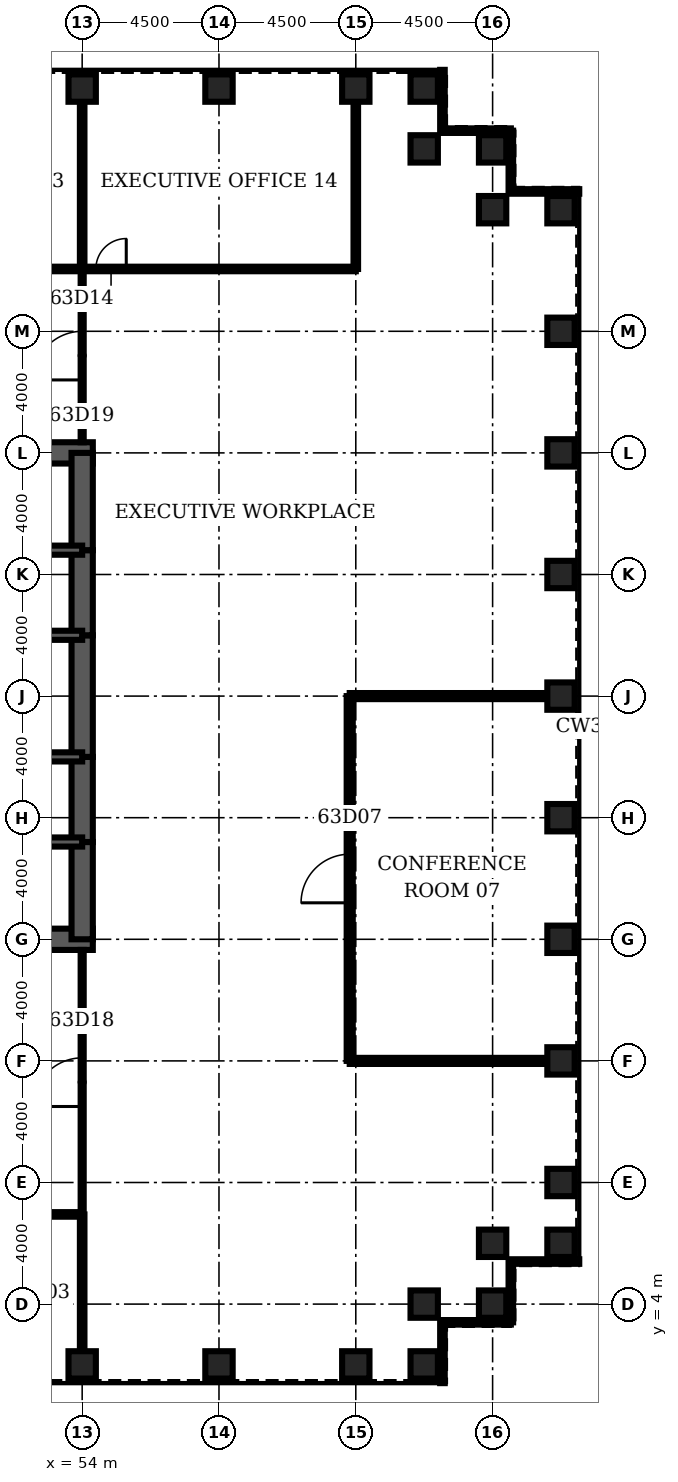
"""IFC4 building model, lengths in metres.
Left out: names, types, materials, properties, quantities, classifications, styles, units other than length and angle.
Written with IfcOpenShell. Run it as: python <this file> out.ifc"""

import sys

from ifc_helpers import new_model, si_unit, direction, frame, frame_2d, origin, origin_2d, place, context, subcontext, project, spatial, rectangle, hollow_rectangle, extrude, element, fill, save


model = new_model("IFC4")
c1 = context("Model", 3, precision=1e-05, world=origin(), true_north=direction((0.0, 1.0)))
c2 = subcontext(c1, "Body", "Model", "MODEL_VIEW")
j1 = project(units=[si_unit("LENGTHUNIT", "METRE"), si_unit("PLANEANGLEUNIT", "RADIAN")], contexts=[c1])
p1 = place(None, origin())
s1 = spatial("IfcSite", under=j1, at=p1, CompositionType="ELEMENT")
p2 = place(p1, origin())
s2 = spatial("IfcBuilding", under=s1, at=p2, CompositionType="ELEMENT")
p3 = place(p2, frame((0.0, 0.0, 279.5)))
s3 = spatial("IfcBuildingStorey", under=s2, at=p3, CompositionType="ELEMENT", Elevation=279.5)
for number, where, z_axis, x_axis in (
    (1, (54.0, 2.0, 0.0), (0.0, 0.0, 1.0), (0.0, 1.0, 0.0)),
    (2, (58.5, 2.0, 0.0), (0.0, 0.0, 1.0), (0.0, 1.0, 0.0)),
    (3, (63.0, 2.0, 0.0), (0.0, 0.0, 1.0), (0.0, 1.0, 0.0)),
    (4, (65.25, 2.0, 0.0), (0.0, 0.0, 1.0), (0.0, 1.0, 0.0)),
    (5, (65.25, 4.0, 0.0), (0.0, 0.0, 1.0), (0.0, 1.0, 0.0)),
    (6, (67.5, 4.0, 0.0), (0.0, 0.0, 1.0), (1.0, 0.0, 0.0)),
    (7, (67.5, 6.0, 0.0), (0.0, 0.0, 1.0), (1.0, 0.0, 0.0)),
    (8, (69.75, 6.0, 0.0), (0.0, 0.0, 1.0), (1.0, 0.0, 0.0)),
    (9, (69.75, 8.0, 0.0), (0.0, 0.0, 1.0), (1.0, 0.0, 0.0)),
    (10, (69.75, 12.0, 0.0), (0.0, 0.0, 1.0), (1.0, 0.0, 0.0)),
    (11, (69.75, 16.0, 0.0), (0.0, 0.0, 1.0), (1.0, 0.0, 0.0)),
    (12, (69.75, 20.0, 0.0), (0.0, 0.0, 1.0), (1.0, 0.0, 0.0)),
    (13, (69.75, 24.0, 0.0), (0.0, 0.0, 1.0), (1.0, 0.0, 0.0)),
    (14, (69.75, 28.0, 0.0), (0.0, 0.0, 1.0), (1.0, 0.0, 0.0)),
    (15, (69.75, 32.0, 0.0), (0.0, 0.0, 1.0), (1.0, 0.0, 0.0)),
    (16, (69.75, 36.0, 0.0), (0.0, 0.0, 1.0), (1.0, 0.0, 0.0)),
    (17, (69.75, 40.0, 0.0), (0.0, 0.0, 1.0), (1.0, 0.0, 0.0)),
    (18, (67.5, 40.0, 0.0), (0.0, 0.0, 1.0), (1.0, 0.0, 0.0)),
    (19, (67.5, 42.0, 0.0), (0.0, 0.0, 1.0), (1.0, 0.0, 0.0)),
    (20, (65.25, 42.0, 0.0), (0.0, 0.0, 1.0), (0.0, 1.0, 0.0)),
    (21, (65.25, 44.0, 0.0), (0.0, 0.0, 1.0), (0.0, 1.0, 0.0)),
    (22, (63.0, 44.0, 0.0), (0.0, 0.0, 1.0), (0.0, 1.0, 0.0)),
    (23, (58.5, 44.0, 0.0), (0.0, 0.0, 1.0), (0.0, 1.0, 0.0)),
    (24, (54.0, 44.0, 0.0), (0.0, 0.0, 1.0), (0.0, 1.0, 0.0)),
):
    element("IfcColumn", number, at=place(p3, frame(where, z_axis=z_axis, x_axis=x_axis)), inside=s3, PredefinedType="COLUMN", context=c2, shape_type="SweptSolid", body=[
        extrude(hollow_rectangle(XDim=0.9, YDim=0.9, WallThickness=0.07, at=origin_2d()), origin(), (0.0, 0.0, 1.0), 4.2),
    ])
for number, where, z_axis, x_axis in (
    (25, (45.0, 16.0, 0.0), (0.0, 0.0, 1.0), (1.0, 0.0, 0.0)),
    (26, (54.35, 32.0, 0.0), (0.0, 0.0, 1.0), (-1.0, 0.0, 0.0)),
):
    element("IfcWall", number, at=place(p3, frame(where, z_axis=z_axis, x_axis=x_axis)), inside=s3, PredefinedType="SHEAR", context=c2, shape_type="SweptSolid", body=[
        extrude(rectangle(XDim=9.35, YDim=0.7, at=frame_2d((4.675, 0.0))), origin(), (0.0, 0.0, 1.0), 4.2),
    ])
p4 = place(p3, frame((54.0, 16.0, 0.0), z_axis=(0.0, 0.0, 1.0), x_axis=(0.0, 1.0, 0.0)))
e27 = element("IfcWall", 27, at=p4, inside=s3, PredefinedType="SHEAR", context=c2, shape_type="SweptSolid", body=[
    extrude(rectangle(XDim=3.2, YDim=0.7, at=frame_2d((1.6, 0.0))), origin(), (0.0, 0.0, 1.0), 4.2),
])
p5 = place(p3, frame((54.0, 19.2, 0.0), z_axis=(0.0, 0.0, 1.0), x_axis=(0.0, 1.0, 0.0)))
e28 = element("IfcWall", 28, at=p5, inside=s3, PredefinedType="SHEAR", context=c2, shape_type="SweptSolid", body=[
    extrude(rectangle(XDim=2.8, YDim=0.7, at=frame_2d((1.4, 0.0))), origin(), (0.0, 0.0, 1.0), 4.2),
])
p6 = place(p5, frame((0.4, 0.0, 0.0)))
e29 = element("IfcOpeningElement", 29, at=p6, cuts=e28, PredefinedType="OPENING", context=c2, shape_type="SweptSolid", body=[
    extrude(rectangle(XDim=1.8, YDim=2.1, at=frame_2d((0.9, 1.05))), frame((0.0, 0.36, 0.0), z_axis=(0.0, -1.0, 0.0), x_axis=(1.0, 0.0, 0.0)), (0.0, 0.0, 1.0), 0.72),
])
p7 = place(p3, frame((54.0, 22.0, 0.0), z_axis=(0.0, 0.0, 1.0), x_axis=(0.0, 1.0, 0.0)))
e30 = element("IfcWall", 30, at=p7, inside=s3, PredefinedType="SHEAR", context=c2, shape_type="SweptSolid", body=[
    extrude(rectangle(XDim=4.0, YDim=0.7, at=frame_2d((2.0, 0.0))), origin(), (0.0, 0.0, 1.0), 4.2),
])
p8 = place(p3, frame((54.0, 26.0, 0.0), z_axis=(0.0, 0.0, 1.0), x_axis=(0.0, 1.0, 0.0)))
e31 = element("IfcWall", 31, at=p8, inside=s3, PredefinedType="SHEAR", context=c2, shape_type="SweptSolid", body=[
    extrude(rectangle(XDim=2.8, YDim=0.7, at=frame_2d((1.4, 0.0))), origin(), (0.0, 0.0, 1.0), 4.2),
])
p9 = place(p8, frame((0.6, 0.0, 0.0)))
e32 = element("IfcOpeningElement", 32, at=p9, cuts=e31, PredefinedType="OPENING", context=c2, shape_type="SweptSolid", body=[
    extrude(rectangle(XDim=1.8, YDim=2.1, at=frame_2d((0.9, 1.05))), frame((0.0, 0.36, 0.0), z_axis=(0.0, -1.0, 0.0), x_axis=(1.0, 0.0, 0.0)), (0.0, 0.0, 1.0), 0.72),
])
p10 = place(p3, frame((54.0, 28.8, 0.0), z_axis=(0.0, 0.0, 1.0), x_axis=(0.0, 1.0, 0.0)))
e33 = element("IfcWall", 33, at=p10, inside=s3, PredefinedType="SHEAR", context=c2, shape_type="SweptSolid", body=[
    extrude(rectangle(XDim=3.2, YDim=0.7, at=frame_2d((1.6, 0.0))), origin(), (0.0, 0.0, 1.0), 4.2),
])
p11 = place(p3, frame((45.0, 19.2, 0.0), z_axis=(0.0, 0.0, 1.0), x_axis=(1.0, 0.0, 0.0)))
e34 = element("IfcWall", 34, at=p11, inside=s3, PredefinedType="SOLIDWALL", context=c2, shape_type="SweptSolid", body=[
    extrude(rectangle(XDim=9.0, YDim=0.3, at=frame_2d((4.5, 0.0))), origin(), (0.0, 0.0, 1.0), 4.2),
])
p12 = place(p11, frame((7.35, 0.0, 0.0)))
e35 = element("IfcOpeningElement", 35, at=p12, cuts=e34, PredefinedType="OPENING", context=c2, shape_type="SweptSolid", body=[
    extrude(rectangle(XDim=1.0, YDim=2.1, at=frame_2d((0.5, 1.05))), frame((0.0, 0.16, 0.0), z_axis=(0.0, -1.0, 0.0), x_axis=(1.0, 0.0, 0.0)), (0.0, 0.0, 1.0), 0.32),
])
p13 = place(p3, frame((45.0, 28.8, 0.0), z_axis=(0.0, 0.0, 1.0), x_axis=(1.0, 0.0, 0.0)))
e36 = element("IfcWall", 36, at=p13, inside=s3, PredefinedType="SOLIDWALL", context=c2, shape_type="SweptSolid", body=[
    extrude(rectangle(XDim=9.0, YDim=0.3, at=frame_2d((4.5, 0.0))), origin(), (0.0, 0.0, 1.0), 4.2),
])
p14 = place(p13, frame((7.35, 0.0, 0.0)))
e37 = element("IfcOpeningElement", 37, at=p14, cuts=e36, PredefinedType="OPENING", context=c2, shape_type="SweptSolid", body=[
    extrude(rectangle(XDim=1.0, YDim=2.1, at=frame_2d((0.5, 1.05))), frame((0.0, 0.16, 0.0), z_axis=(0.0, -1.0, 0.0), x_axis=(1.0, 0.0, 0.0)), (0.0, 0.0, 1.0), 0.32),
])
p15 = place(p3, frame((48.0, 22.0, 0.0), z_axis=(0.0, 0.0, 1.0), x_axis=(1.0, 0.0, 0.0)))
e38 = element("IfcWall", 38, at=p15, inside=s3, PredefinedType="SOLIDWALL", context=c2, shape_type="SweptSolid", body=[
    extrude(rectangle(XDim=6.0, YDim=0.3, at=frame_2d((3.0, 0.0))), origin(), (0.0, 0.0, 1.0), 4.2),
])
p16 = place(p15, frame((2.0, 0.0, 0.0)))
e39 = element("IfcOpeningElement", 39, at=p16, cuts=e38, PredefinedType="OPENING", context=c2, shape_type="SweptSolid", body=[
    extrude(rectangle(XDim=1.0, YDim=2.1, at=frame_2d((0.5, 1.05))), frame((0.0, 0.16, 0.0), z_axis=(0.0, -1.0, 0.0), x_axis=(1.0, 0.0, 0.0)), (0.0, 0.0, 1.0), 0.32),
])
p17 = place(p15, frame((4.1, 0.0, 0.0)))
e40 = element("IfcOpeningElement", 40, at=p17, cuts=e38, PredefinedType="OPENING", context=c2, shape_type="SweptSolid", body=[
    extrude(rectangle(XDim=1.0, YDim=2.1, at=frame_2d((0.5, 1.05))), frame((0.0, 0.16, 0.0), z_axis=(0.0, -1.0, 0.0), x_axis=(1.0, 0.0, 0.0)), (0.0, 0.0, 1.0), 0.32),
])
p18 = place(p3, frame((48.0, 26.0, 0.0), z_axis=(0.0, 0.0, 1.0), x_axis=(1.0, 0.0, 0.0)))
e41 = element("IfcWall", 41, at=p18, inside=s3, PredefinedType="SOLIDWALL", context=c2, shape_type="SweptSolid", body=[
    extrude(rectangle(XDim=6.0, YDim=0.3, at=frame_2d((3.0, 0.0))), origin(), (0.0, 0.0, 1.0), 4.2),
])
p19 = place(p3, frame((49.5, 6.95, 0.0), z_axis=(0.0, 0.0, 1.0), x_axis=(1.0, 0.0, 0.0)))
e42 = element("IfcWall", 42, at=p19, inside=s3, PredefinedType="PARTITIONING", context=c2, shape_type="SweptSolid", body=[
    extrude(rectangle(XDim=4.5, YDim=0.15, at=frame_2d((2.25, 0.0))), origin(), (0.0, 0.0, 1.0), 3.0),
])
p20 = place(p19, frame((0.45, 0.0, 0.0)))
e43 = element("IfcOpeningElement", 43, at=p20, cuts=e42, PredefinedType="OPENING", context=c2, shape_type="SweptSolid", body=[
    extrude(rectangle(XDim=1.0, YDim=2.1, at=frame_2d((0.5, 1.05))), frame((0.0, 0.085, 0.0), z_axis=(0.0, -1.0, 0.0), x_axis=(1.0, 0.0, 0.0)), (0.0, 0.0, 1.0), 0.17),
])
for number, where, z_axis, x_axis in (
    (44, (62.8, 12.0, 0.0), (0.0, 0.0, 1.0), (1.0, 0.0, 0.0)),
    (45, (62.8, 24.0, 0.0), (0.0, 0.0, 1.0), (1.0, 0.0, 0.0)),
):
    element("IfcWall", number, at=place(p3, frame(where, z_axis=z_axis, x_axis=x_axis)), inside=s3, PredefinedType="PARTITIONING", context=c2, shape_type="SweptSolid", body=[
        extrude(rectangle(XDim=6.5, YDim=0.2, at=frame_2d((3.25, 0.0))), origin(), (0.0, 0.0, 1.0), 3.0),
    ])
p21 = place(p3, frame((9.0, 38.05, 0.0), z_axis=(0.0, 0.0, 1.0), x_axis=(1.0, 0.0, 0.0)))
e46 = element("IfcWall", 46, at=p21, inside=s3, PredefinedType="PARTITIONING", context=c2, shape_type="SweptSolid", body=[
    extrude(rectangle(XDim=54.0, YDim=0.15, at=frame_2d((27.0, 0.0))), origin(), (0.0, 0.0, 1.0), 3.0),
])
p22 = place(p21, frame((0.45, 0.0, 0.0)))
e47 = element("IfcOpeningElement", 47, at=p22, cuts=e46, PredefinedType="OPENING", context=c2, shape_type="SweptSolid", body=[
    extrude(rectangle(XDim=1.0, YDim=2.1, at=frame_2d((0.5, 1.05))), frame((0.0, 0.085, 0.0), z_axis=(0.0, -1.0, 0.0), x_axis=(1.0, 0.0, 0.0)), (0.0, 0.0, 1.0), 0.17),
])
p23 = place(p21, frame((9.45, 0.0, 0.0)))
e48 = element("IfcOpeningElement", 48, at=p23, cuts=e46, PredefinedType="OPENING", context=c2, shape_type="SweptSolid", body=[
    extrude(rectangle(XDim=1.0, YDim=2.1, at=frame_2d((0.5, 1.05))), frame((0.0, 0.085, 0.0), z_axis=(0.0, -1.0, 0.0), x_axis=(1.0, 0.0, 0.0)), (0.0, 0.0, 1.0), 0.17),
])
p24 = place(p21, frame((18.45, 0.0, 0.0)))
e49 = element("IfcOpeningElement", 49, at=p24, cuts=e46, PredefinedType="OPENING", context=c2, shape_type="SweptSolid", body=[
    extrude(rectangle(XDim=1.0, YDim=2.1, at=frame_2d((0.5, 1.05))), frame((0.0, 0.085, 0.0), z_axis=(0.0, -1.0, 0.0), x_axis=(1.0, 0.0, 0.0)), (0.0, 0.0, 1.0), 0.17),
])
p25 = place(p21, frame((27.45, 0.0, 0.0)))
e50 = element("IfcOpeningElement", 50, at=p25, cuts=e46, PredefinedType="OPENING", context=c2, shape_type="SweptSolid", body=[
    extrude(rectangle(XDim=1.0, YDim=2.1, at=frame_2d((0.5, 1.05))), frame((0.0, 0.085, 0.0), z_axis=(0.0, -1.0, 0.0), x_axis=(1.0, 0.0, 0.0)), (0.0, 0.0, 1.0), 0.17),
])
p26 = place(p21, frame((36.45, 0.0, 0.0)))
e51 = element("IfcOpeningElement", 51, at=p26, cuts=e46, PredefinedType="OPENING", context=c2, shape_type="SweptSolid", body=[
    extrude(rectangle(XDim=1.0, YDim=2.1, at=frame_2d((0.5, 1.05))), frame((0.0, 0.085, 0.0), z_axis=(0.0, -1.0, 0.0), x_axis=(1.0, 0.0, 0.0)), (0.0, 0.0, 1.0), 0.17),
])
p27 = place(p21, frame((45.45, 0.0, 0.0)))
e52 = element("IfcOpeningElement", 52, at=p27, cuts=e46, PredefinedType="OPENING", context=c2, shape_type="SweptSolid", body=[
    extrude(rectangle(XDim=1.0, YDim=2.1, at=frame_2d((0.5, 1.05))), frame((0.0, 0.085, 0.0), z_axis=(0.0, -1.0, 0.0), x_axis=(1.0, 0.0, 0.0)), (0.0, 0.0, 1.0), 0.17),
])
p28 = place(p3, frame((54.0, 2.45, 0.0), z_axis=(0.0, 0.0, 1.0), x_axis=(0.0, 1.0, 0.0)))
e53 = element("IfcWall", 53, at=p28, inside=s3, PredefinedType="PARTITIONING", context=c2, shape_type="SweptSolid", body=[
    extrude(rectangle(XDim=4.5, YDim=0.15, at=frame_2d((2.25, 0.0))), origin(), (0.0, 0.0, 1.0), 3.0),
])
p29 = place(p3, frame((54.0, 6.95, 0.0), z_axis=(0.0, 0.0, 1.0), x_axis=(0.0, 1.0, 0.0)))
e54 = element("IfcWall", 54, at=p29, inside=s3, PredefinedType="PARTITIONING", context=c2, shape_type="SweptSolid", body=[
    extrude(rectangle(XDim=8.7, YDim=0.1, at=frame_2d((4.35, 0.0))), origin(), (0.0, 0.0, 1.0), 3.0),
])
p30 = place(p29, frame((3.55, 0.0, 0.0)))
e55 = element("IfcOpeningElement", 55, at=p30, cuts=e54, PredefinedType="OPENING", context=c2, shape_type="SweptSolid", body=[
    extrude(rectangle(XDim=1.6, YDim=2.1, at=frame_2d((0.8, 1.05))), frame((0.0, 0.06, 0.0), z_axis=(0.0, -1.0, 0.0), x_axis=(1.0, 0.0, 0.0)), (0.0, 0.0, 1.0), 0.12),
])
p31 = place(p3, frame((54.0, 32.35, 0.0), z_axis=(0.0, 0.0, 1.0), x_axis=(0.0, 1.0, 0.0)))
e56 = element("IfcWall", 56, at=p31, inside=s3, PredefinedType="PARTITIONING", context=c2, shape_type="SweptSolid", body=[
    extrude(rectangle(XDim=5.7, YDim=0.1, at=frame_2d((2.85, 0.0))), origin(), (0.0, 0.0, 1.0), 3.0),
])
p32 = place(p31, frame((2.05, 0.0, 0.0)))
e57 = element("IfcOpeningElement", 57, at=p32, cuts=e56, PredefinedType="OPENING", context=c2, shape_type="SweptSolid", body=[
    extrude(rectangle(XDim=1.6, YDim=2.1, at=frame_2d((0.8, 1.05))), frame((0.0, 0.06, 0.0), z_axis=(0.0, -1.0, 0.0), x_axis=(1.0, 0.0, 0.0)), (0.0, 0.0, 1.0), 0.12),
])
p33 = place(p3, frame((54.0, 38.05, 0.0), z_axis=(0.0, 0.0, 1.0), x_axis=(0.0, 1.0, 0.0)))
e58 = element("IfcWall", 58, at=p33, inside=s3, PredefinedType="PARTITIONING", context=c2, shape_type="SweptSolid", body=[
    extrude(rectangle(XDim=5.5, YDim=0.15, at=frame_2d((2.75, 0.0))), origin(), (0.0, 0.0, 1.0), 3.0),
])
p34 = place(p3, frame((62.8, 12.0, 0.0), z_axis=(0.0, 0.0, 1.0), x_axis=(0.0, 1.0, 0.0)))
e59 = element("IfcWall", 59, at=p34, inside=s3, PredefinedType="PARTITIONING", context=c2, shape_type="SweptSolid", body=[
    extrude(rectangle(XDim=12.0, YDim=0.2, at=frame_2d((6.0, 0.0))), origin(), (0.0, 0.0, 1.0), 3.0),
])
p35 = place(p34, frame((5.2, 0.0, 0.0)))
e60 = element("IfcOpeningElement", 60, at=p35, cuts=e59, PredefinedType="OPENING", context=c2, shape_type="SweptSolid", body=[
    extrude(rectangle(XDim=1.6, YDim=2.1, at=frame_2d((0.8, 1.05))), frame((0.0, 0.11, 0.0), z_axis=(0.0, -1.0, 0.0), x_axis=(1.0, 0.0, 0.0)), (0.0, 0.0, 1.0), 0.22),
])
p36 = place(p3, frame((63.0, 38.05, 0.0), z_axis=(0.0, 0.0, 1.0), x_axis=(0.0, 1.0, 0.0)))
e61 = element("IfcWall", 61, at=p36, inside=s3, PredefinedType="PARTITIONING", context=c2, shape_type="SweptSolid", body=[
    extrude(rectangle(XDim=5.5, YDim=0.15, at=frame_2d((2.75, 0.0))), origin(), (0.0, 0.0, 1.0), 3.0),
])
p37 = place(p3, frame((65.85, 1.4, 0.0), z_axis=(0.0, 0.0, 1.0), x_axis=(0.0, 1.0, 0.0)))
e62 = element("IfcWall", 62, at=p37, inside=s3, PredefinedType="ELEMENTEDWALL", context=c2, shape_type="SweptSolid", body=[
    extrude(rectangle(XDim=2.0, YDim=0.15, at=frame_2d((1.0, 0.0))), origin(), (0.0, 0.0, 1.0), 4.04),
])
p38 = place(p3, frame((65.85, 3.4, 0.0), z_axis=(0.0, 0.0, 1.0), x_axis=(1.0, 0.0, 0.0)))
e63 = element("IfcWall", 63, at=p38, inside=s3, PredefinedType="ELEMENTEDWALL", context=c2, shape_type="SweptSolid", body=[
    extrude(rectangle(XDim=2.25, YDim=0.15, at=frame_2d((1.125, 0.0))), origin(), (0.0, 0.0, 1.0), 4.04),
])
p39 = place(p3, frame((68.1, 3.4, 0.0), z_axis=(0.0, 0.0, 1.0), x_axis=(0.0, 1.0, 0.0)))
e64 = element("IfcWall", 64, at=p39, inside=s3, PredefinedType="ELEMENTEDWALL", context=c2, shape_type="SweptSolid", body=[
    extrude(rectangle(XDim=2.0, YDim=0.15, at=frame_2d((1.0, 0.0))), origin(), (0.0, 0.0, 1.0), 4.04),
])
for number, where, z_axis, x_axis in (
    (65, (68.1, 5.4, 0.0), (0.0, 0.0, 1.0), (1.0, 0.0, 0.0)),
    (66, (70.35, 40.6, 0.0), (0.0, 0.0, 1.0), (-1.0, 0.0, 0.0)),
):
    element("IfcWall", number, at=place(p3, frame(where, z_axis=z_axis, x_axis=x_axis)), inside=s3, PredefinedType="ELEMENTEDWALL", context=c2, shape_type="SweptSolid", body=[
        extrude(rectangle(XDim=2.25, YDim=0.15, at=frame_2d((1.125, 0.0))), origin(), (0.0, 0.0, 1.0), 4.04),
    ])
p40 = place(p3, frame((68.1, 40.6, 0.0), z_axis=(0.0, 0.0, 1.0), x_axis=(0.0, 1.0, 0.0)))
e67 = element("IfcWall", 67, at=p40, inside=s3, PredefinedType="ELEMENTEDWALL", context=c2, shape_type="SweptSolid", body=[
    extrude(rectangle(XDim=2.0, YDim=0.15, at=frame_2d((1.0, 0.0))), origin(), (0.0, 0.0, 1.0), 4.04),
])
p41 = place(p3, frame((68.1, 42.6, 0.0), z_axis=(0.0, 0.0, 1.0), x_axis=(-1.0, 0.0, 0.0)))
e68 = element("IfcWall", 68, at=p41, inside=s3, PredefinedType="ELEMENTEDWALL", context=c2, shape_type="SweptSolid", body=[
    extrude(rectangle(XDim=2.25, YDim=0.15, at=frame_2d((1.125, 0.0))), origin(), (0.0, 0.0, 1.0), 4.04),
])
p42 = place(p3, frame((65.85, 42.6, 0.0), z_axis=(0.0, 0.0, 1.0), x_axis=(0.0, 1.0, 0.0)))
e69 = element("IfcWall", 69, at=p42, inside=s3, PredefinedType="ELEMENTEDWALL", context=c2, shape_type="SweptSolid", body=[
    extrude(rectangle(XDim=2.0, YDim=0.15, at=frame_2d((1.0, 0.0))), origin(), (0.0, 0.0, 1.0), 4.04),
])
p43 = place(p35, origin())
e70 = element("IfcDoor", 70, at=p43, inside=s3, OperationType="SINGLE_SWING_LEFT", PredefinedType="DOOR", context=c2, shape_type="SweptSolid", body=[
    extrude(rectangle(XDim=1.6, YDim=2.1, at=frame_2d((0.8, 1.05))), frame((0.0, 0.025, 0.0), z_axis=(0.0, -1.0, 0.0), x_axis=(1.0, 0.0, 0.0)), (0.0, 0.0, 1.0), 0.05),
])
fill(e60, e70)
p44 = place(p27, origin())
e71 = element("IfcDoor", 71, at=p44, inside=s3, OperationType="SINGLE_SWING_RIGHT", PredefinedType="DOOR", context=c2, shape_type="SweptSolid", body=[
    extrude(rectangle(XDim=1.0, YDim=2.1, at=frame_2d((0.5, 1.05))), frame((0.0, 0.025, 0.0), z_axis=(0.0, -1.0, 0.0), x_axis=(1.0, 0.0, 0.0)), (0.0, 0.0, 1.0), 0.05),
])
fill(e52, e71)
p45 = place(p30, origin())
e72 = element("IfcDoor", 72, at=p45, inside=s3, OperationType="SINGLE_SWING_LEFT", PredefinedType="DOOR", context=c2, shape_type="SweptSolid", body=[
    extrude(rectangle(XDim=1.6, YDim=2.1, at=frame_2d((0.8, 1.05))), frame((0.0, 0.025, 0.0), z_axis=(0.0, -1.0, 0.0), x_axis=(1.0, 0.0, 0.0)), (0.0, 0.0, 1.0), 0.05),
])
fill(e55, e72)
p46 = place(p32, origin())
e73 = element("IfcDoor", 73, at=p46, inside=s3, OperationType="SINGLE_SWING_LEFT", PredefinedType="DOOR", context=c2, shape_type="SweptSolid", body=[
    extrude(rectangle(XDim=1.6, YDim=2.1, at=frame_2d((0.8, 1.05))), frame((0.0, 0.025, 0.0), z_axis=(0.0, -1.0, 0.0), x_axis=(1.0, 0.0, 0.0)), (0.0, 0.0, 1.0), 0.05),
])
fill(e57, e73)
p47 = place(p12, origin())
e74 = element("IfcDoor", 74, at=p47, inside=s3, OperationType="SINGLE_SWING_RIGHT", PredefinedType="DOOR", context=c2, shape_type="SweptSolid", body=[
    extrude(rectangle(XDim=1.0, YDim=2.1, at=frame_2d((0.5, 1.05))), frame((0.0, 0.025, 0.0), z_axis=(0.0, -1.0, 0.0), x_axis=(1.0, 0.0, 0.0)), (0.0, 0.0, 1.0), 0.05),
])
fill(e35, e74)
p48 = place(p14, origin())
e75 = element("IfcDoor", 75, at=p48, inside=s3, OperationType="SINGLE_SWING_RIGHT", PredefinedType="DOOR", context=c2, shape_type="SweptSolid", body=[
    extrude(rectangle(XDim=1.0, YDim=2.1, at=frame_2d((0.5, 1.05))), frame((0.0, 0.025, 0.0), z_axis=(0.0, -1.0, 0.0), x_axis=(1.0, 0.0, 0.0)), (0.0, 0.0, 1.0), 0.05),
])
fill(e37, e75)
p49 = place(p6, origin())
e76 = element("IfcDoor", 76, at=p49, inside=s3, OperationType="SINGLE_SWING_LEFT", PredefinedType="DOOR", context=c2, shape_type="SweptSolid", body=[
    extrude(rectangle(XDim=1.8, YDim=2.1, at=frame_2d((0.9, 1.05))), frame((0.0, 0.35, 0.0), z_axis=(0.0, -1.0, 0.0), x_axis=(1.0, 0.0, 0.0)), (0.0, 0.0, 1.0), 0.699),
])
fill(e29, e76)
p50 = place(p9, origin())
e77 = element("IfcDoor", 77, at=p50, inside=s3, OperationType="SINGLE_SWING_LEFT", PredefinedType="DOOR", context=c2, shape_type="SweptSolid", body=[
    extrude(rectangle(XDim=1.8, YDim=2.1, at=frame_2d((0.9, 1.05))), frame((0.0, 0.35, 0.0), z_axis=(0.0, -1.0, 0.0), x_axis=(1.0, 0.0, 0.0)), (0.0, 0.0, 1.0), 0.699),
])
fill(e32, e77)
p51 = place(p17, origin())
e78 = element("IfcDoor", 78, at=p51, inside=s3, OperationType="SINGLE_SWING_RIGHT", PredefinedType="DOOR", context=c2, shape_type="SweptSolid", body=[
    extrude(rectangle(XDim=1.0, YDim=2.1, at=frame_2d((0.5, 1.05))), frame((0.0, 0.025, 0.0), z_axis=(0.0, -1.0, 0.0), x_axis=(1.0, 0.0, 0.0)), (0.0, 0.0, 1.0), 0.05),
])
fill(e40, e78)
save(model, sys.argv[1])
